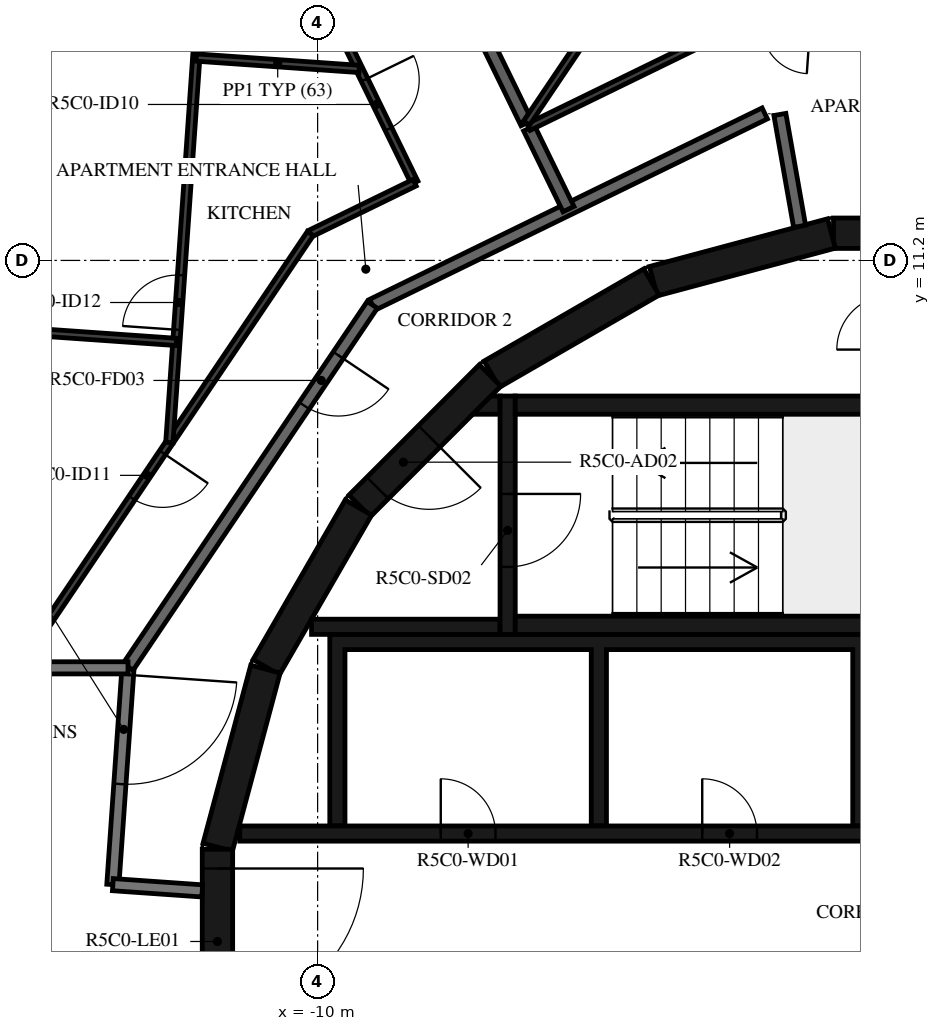
"""IFC4 building model, lengths in metres.
Left out: names, types, materials, properties, quantities, classifications, styles, units other than length and angle.
Written with IfcOpenShell. Run it as: python <this file> out.ifc"""

import sys

from ifc_helpers import new_model, si_unit, direction, frame, frame_2d, origin, place, context, subcontext, project, spatial, polyline, rectangle, outline, extrude, element, fill, save


model = new_model("IFC4")
c1 = context("Model", 3, precision=1e-05, world=origin(), true_north=direction((0.0, 1.0)))
c2 = subcontext(c1, "Body", "Model", "MODEL_VIEW")
j1 = project(units=[si_unit("LENGTHUNIT", "METRE"), si_unit("PLANEANGLEUNIT", "RADIAN")], contexts=[c1])
p1 = place(None, origin())
s1 = spatial("IfcSite", under=j1, at=p1, CompositionType="ELEMENT")
p2 = place(p1, origin())
s2 = spatial("IfcBuilding", under=s1, at=p2, CompositionType="ELEMENT")
p3 = place(p2, frame((0.0, 0.0, 216.4)))
s3 = spatial("IfcBuildingStorey", under=s2, at=p3, CompositionType="ELEMENT", Elevation=216.4)
for number, where, z_axis, x_axis in (
    (1, (1.516, 11.647, 0.0), (0.0, 0.0, 1.0), (-1.0, 0.0, 0.0)),
    (2, (-1.55, 11.643, 0.0), (0.0, 0.0, 1.0), (-0.966, -0.259, 0.0)),
    (3, (-4.51, 10.845, 0.0), (0.0, 0.0, 1.0), (-0.866, -0.5, 0.0)),
):
    element("IfcWall", number, at=place(p3, frame(where, z_axis=z_axis, x_axis=x_axis)), inside=s3, PredefinedType="SHEAR", context=c2, shape_type="SweptSolid", body=[
        extrude(rectangle(XDim=3.033, YDim=0.5, at=frame_2d((1.516, 0.0))), origin(), (0.0, 0.0, 1.0), 3.05),
    ])
p4 = place(p3, frame((-7.164, 9.308, 0.0), z_axis=(0.0, 0.0, 1.0), x_axis=(-0.707106781187, -0.707106781187, 0.0)))
e4 = element("IfcWall", 4, at=p4, inside=s3, PredefinedType="SHEAR", context=c2, shape_type="SweptSolid", body=[
    extrude(rectangle(XDim=3.032, YDim=0.5, at=frame_2d((1.516, 0.0))), origin(), (0.0, 0.0, 1.0), 3.05),
])
p5 = place(p4, frame((1.416, 0.0, 0.0)))
e5 = element("IfcOpeningElement", 5, at=p5, cuts=e4, PredefinedType="OPENING", context=c2, shape_type="SweptSolid", body=[
    extrude(rectangle(XDim=1.2, YDim=2.1, at=frame_2d((0.6, 1.05))), frame((0.0, 0.26, 0.0), z_axis=(0.0, -1.0, 0.0), x_axis=(1.0, 0.0, 0.0)), (0.0, 0.0, 1.0), 0.52),
])
for number, where, z_axis, x_axis in (
    (6, (-9.329, 7.137, 0.0), (0.0, 0.0, 1.0), (-0.5, -0.866, 0.0)),
    (7, (-10.858, 4.479, 0.0), (0.0, 0.0, 1.0), (-0.259, -0.966, 0.0)),
):
    element("IfcWall", number, at=place(p3, frame(where, z_axis=z_axis, x_axis=x_axis)), inside=s3, PredefinedType="SHEAR", context=c2, shape_type="SweptSolid", body=[
        extrude(rectangle(XDim=3.033, YDim=0.5, at=frame_2d((1.516, 0.0))), origin(), (0.0, 0.0, 1.0), 3.05),
    ])
p6 = place(p3, frame((-11.647, 1.516, 0.0), z_axis=(0.0, 0.0, 1.0), x_axis=(0.0, -1.0, 0.0)))
e8 = element("IfcWall", 8, at=p6, inside=s3, PredefinedType="SHEAR", context=c2, shape_type="SweptSolid", body=[
    extrude(rectangle(XDim=3.033, YDim=0.5, at=frame_2d((1.516, 0.0))), origin(), (0.0, 0.0, 1.0), 3.05),
])
p7 = place(p6, frame((0.316, 0.0, 0.0)))
e9 = element("IfcOpeningElement", 9, at=p7, cuts=e8, PredefinedType="OPENING", context=c2, shape_type="SweptSolid", body=[
    extrude(rectangle(XDim=2.4, YDim=2.1, at=frame_2d((1.2, 1.05))), frame((0.0, 0.26, 0.0), z_axis=(0.0, -1.0, 0.0), x_axis=(1.0, 0.0, 0.0)), (0.0, 0.0, 1.0), 0.52),
])
for number, where, z_axis, x_axis in (
    (10, (-6.75, 5.2, 0.0), (0.0, 0.0, 1.0), (1.0, 0.0, 0.0)),
    (11, (-6.75, 8.82, 0.0), (0.0, 0.0, 1.0), (1.0, 0.0, 0.0)),
):
    element("IfcWall", number, at=place(p3, frame(where, z_axis=z_axis, x_axis=x_axis)), inside=s3, PredefinedType="SHEAR", context=c2, shape_type="SweptSolid", body=[
        extrude(rectangle(XDim=6.75, YDim=0.3, at=frame_2d((3.375, 0.0))), origin(), (0.0, 0.0, 1.0), 3.05),
    ])
p8 = place(p3, frame((-6.875, 8.97, 0.0), z_axis=(0.0, 0.0, 1.0), x_axis=(0.0, -1.0, 0.0)))
e12 = element("IfcWall", 12, at=p8, inside=s3, PredefinedType="SHEAR", context=c2, shape_type="SweptSolid", body=[
    extrude(rectangle(XDim=3.92, YDim=0.25, at=frame_2d((1.96, 0.0))), origin(), (0.0, 0.0, 1.0), 3.05),
])
p9 = place(p8, frame((1.61, 0.0, 0.0)))
e13 = element("IfcOpeningElement", 13, at=p9, cuts=e12, PredefinedType="OPENING", context=c2, shape_type="SweptSolid", body=[
    extrude(rectangle(XDim=1.2, YDim=2.1, at=frame_2d((0.6, 1.05))), frame((0.0, 0.135, 0.0), z_axis=(0.0, -1.0, 0.0), x_axis=(1.0, 0.0, 0.0)), (0.0, 0.0, 1.0), 0.27),
])
p10 = place(p3, frame((-7.0, 5.175, 0.0), z_axis=(0.0, 0.0, 1.0), x_axis=(-1.0, 0.0, 0.0)))
e14 = element("IfcWall", 14, at=p10, inside=s3, PredefinedType="SHEAR", context=c2, shape_type="SweptSolid", body=[
    extrude(rectangle(XDim=3.1, YDim=0.25, at=frame_2d((1.55, 0.0))), origin(), (0.0, 0.0, 1.0), 3.05),
])
p11 = place(p3, origin())
e15 = element("IfcWall", 15, at=p11, inside=s3, PredefinedType="SHEAR", context=c2, shape_type="SweptSolid", body=[
    extrude(outline(polyline([(-7.148, 8.97), (-7.0, 8.97), (-7.0, 8.67), (-7.448, 8.67), (-7.148, 8.97)])), origin(), (0.0, 0.0, 1.0), 3.05),
])
p12 = place(p3, origin())
e16 = element("IfcWall", 16, at=p12, inside=s3, PredefinedType="SHEAR", context=c2, shape_type="SweptSolid", body=[
    extrude(outline(polyline([(-9.55, 4.8), (-5.5, 4.8), (-5.5, 1.9), (-5.25, 1.9), (-5.25, 4.8), (-1.2, 4.8), (-1.2, 1.9), (-0.95, 1.9), (-0.95, 4.8), (0.95, 4.8), (0.95, 1.9), (1.2, 1.9), (1.2, 4.8), (3.1, 4.8), (3.1, 1.9), (3.35, 1.9), (3.35, 4.8), (5.25, 4.8), (5.25, 1.9), (5.5, 1.9), (5.5, 4.8), (7.4, 4.8), (7.4, 1.9), (7.65, 1.9), (7.65, 4.8), (9.55, 4.8), (9.55, 1.9), (9.8, 1.9), (9.8, 4.8), (9.8, 5.05), (-9.8, 5.05), (-9.8, 4.8), (-9.8, 1.9), (-9.55, 1.9), (-9.55, 4.8)])), origin(), (0.0, 0.0, 1.0), 3.05),
])
p13 = place(p3, frame((-11.28, 1.775, 0.0), z_axis=(0.0, 0.0, 1.0), x_axis=(1.0, 0.0, 0.0)))
e17 = element("IfcWall", 17, at=p13, inside=s3, PredefinedType="SHEAR", context=c2, shape_type="SweptSolid", body=[
    extrude(rectangle(XDim=14.38, YDim=0.25, at=frame_2d((7.19, 0.0))), origin(), (0.0, 0.0, 1.0), 3.05),
])
p14 = place(p13, frame((10.73, 0.0, 0.0)))
e18 = element("IfcOpeningElement", 18, at=p14, cuts=e17, PredefinedType="OPENING", context=c2, shape_type="SweptSolid", body=[
    extrude(rectangle(XDim=1.1, YDim=2.1, at=frame_2d((0.55, 1.05))), frame((0.0, 0.135, 0.0), z_axis=(0.0, -1.0, 0.0), x_axis=(1.0, 0.0, 0.0)), (0.0, 0.0, 1.0), 0.27),
])
p15 = place(p13, frame((12.88, 0.0, 0.0)))
e19 = element("IfcOpeningElement", 19, at=p15, cuts=e17, PredefinedType="OPENING", context=c2, shape_type="SweptSolid", body=[
    extrude(rectangle(XDim=1.1, YDim=2.1, at=frame_2d((0.55, 1.05))), frame((0.0, 0.135, 0.0), z_axis=(0.0, -1.0, 0.0), x_axis=(1.0, 0.0, 0.0)), (0.0, 0.0, 1.0), 0.27),
])
p16 = place(p13, frame((3.305, 0.0, 0.0)))
e20 = element("IfcOpeningElement", 20, at=p16, cuts=e17, PredefinedType="OPENING", context=c2, shape_type="SweptSolid", body=[
    extrude(rectangle(XDim=0.9, YDim=2.1, at=frame_2d((0.45, 1.05))), frame((0.0, 0.135, 0.0), z_axis=(0.0, -1.0, 0.0), x_axis=(1.0, 0.0, 0.0)), (0.0, 0.0, 1.0), 0.27),
])
p17 = place(p13, frame((7.605, 0.0, 0.0)))
e21 = element("IfcOpeningElement", 21, at=p17, cuts=e17, PredefinedType="OPENING", context=c2, shape_type="SweptSolid", body=[
    extrude(rectangle(XDim=0.9, YDim=2.1, at=frame_2d((0.45, 1.05))), frame((0.0, 0.135, 0.0), z_axis=(0.0, -1.0, 0.0), x_axis=(1.0, 0.0, 0.0)), (0.0, 0.0, 1.0), 0.27),
])
p18 = place(p3, frame((-13.118, 4.5, 0.0), z_axis=(0.0, 0.0, 1.0), x_axis=(-0.069746872611, -0.99756472159, 0.0)))
e22 = element("IfcWall", 22, at=p18, inside=s3, PredefinedType="STANDARD", context=c2, shape_type="SweptSolid", body=[
    extrude(rectangle(XDim=3.574, YDim=0.2, at=frame_2d((1.787, 0.0))), origin(), (0.0, 0.0, 1.0), 3.05),
])
p19 = place(p18, frame((0.115, 0.0, 0.0)))
e23 = element("IfcOpeningElement", 23, at=p19, cuts=e22, PredefinedType="OPENING", context=c2, shape_type="SweptSolid", body=[
    extrude(rectangle(XDim=1.8, YDim=2.1, at=frame_2d((0.9, 1.05))), frame((0.0, 0.11, 0.0), z_axis=(0.0, -1.0, 0.0), x_axis=(1.0, 0.0, 0.0)), (0.0, 0.0, 1.0), 0.22),
])
p20 = place(p3, frame((-13.367, 0.935, 0.0), z_axis=(0.0, 0.0, 1.0), x_axis=(0.997553656289, -0.069904955655, 0.0)))
e24 = element("IfcWall", 24, at=p20, inside=s3, PredefinedType="STANDARD", context=c2, shape_type="SweptSolid", body=[
    extrude(rectangle(XDim=1.474, YDim=0.2, at=frame_2d((0.737, 0.0))), origin(), (0.0, 0.0, 1.0), 3.05),
])
p21 = place(p3, frame((-2.074, 11.761, 0.0), z_axis=(0.0, 0.0, 1.0), x_axis=(-0.173740587112, 0.984791454263, 0.0)))
e25 = element("IfcWall", 25, at=p21, inside=s3, PredefinedType="STANDARD", context=c2, shape_type="SweptSolid", body=[
    extrude(rectangle(XDim=1.867, YDim=0.2, at=frame_2d((0.934, 0.0))), origin(), (0.0, 0.0, 1.0), 3.05),
])
p22 = place(p3, frame((-2.647, 13.618, 0.0), z_axis=(0.0, 0.0, 1.0), x_axis=(-0.898796543751, -0.438366026218, 0.0)))
e26 = element("IfcWall", 26, at=p22, inside=s3, PredefinedType="STANDARD", context=c2, shape_type="SweptSolid", body=[
    extrude(rectangle(XDim=7.181, YDim=0.2, at=frame_2d((3.591, 0.0))), origin(), (0.0, 0.0, 1.0), 3.05),
])
p23 = place(p3, frame((-9.101, 10.47, 0.0), z_axis=(0.0, 0.0, 1.0), x_axis=(-0.559195469534, -0.829035841718, 0.0)))
e27 = element("IfcWall", 27, at=p23, inside=s3, PredefinedType="STANDARD", context=c2, shape_type="SweptSolid", body=[
    extrude(rectangle(XDim=7.181, YDim=0.2, at=frame_2d((3.591, 0.0))), origin(), (0.0, 0.0, 1.0), 3.05),
])
p24 = place(p23, frame((1.0, 0.0, 0.0)))
e28 = element("IfcOpeningElement", 28, at=p24, cuts=e27, PredefinedType="OPENING", context=c2, shape_type="SweptSolid", body=[
    extrude(rectangle(XDim=1.0, YDim=2.1, at=frame_2d((0.5, 1.05))), frame((0.0, 0.11, 0.0), z_axis=(0.0, -1.0, 0.0), x_axis=(1.0, 0.0, 0.0)), (0.0, 0.0, 1.0), 0.22),
])
p25 = place(p3, frame((-13.118, 4.5, 0.0), z_axis=(0.0, 0.0, 1.0), x_axis=(-1.0, 0.0, 0.0)))
e29 = element("IfcWall", 29, at=p25, inside=s3, PredefinedType="STANDARD", context=c2, shape_type="SweptSolid", body=[
    extrude(rectangle(XDim=4.782, YDim=0.2, at=frame_2d((2.391, 0.0))), origin(), (0.0, 0.0, 1.0), 3.05),
])
p26 = place(p3, frame((-6.522, 13.373, 0.0), z_axis=(0.0, 0.0, 1.0), x_axis=(0.438277270821, -0.8988398266, 0.0)))
e30 = element("IfcWall", 30, at=p26, inside=s3, PredefinedType="STANDARD", context=c2, shape_type="SweptSolid", body=[
    extrude(rectangle(XDim=1.479, YDim=0.2, at=frame_2d((0.74, 0.0))), origin(), (0.0, 0.0, 1.0), 3.05),
])
p27 = place(p3, frame((-8.219, 16.851, 0.0), z_axis=(0.0, 0.0, 1.0), x_axis=(0.438291091101, -0.898833087654, 0.0)))
e31 = element("IfcWall", 31, at=p27, inside=s3, PredefinedType="STANDARD", context=c2, shape_type="SweptSolid", body=[
    extrude(rectangle(XDim=3.774, YDim=0.2, at=frame_2d((1.887, 0.0))), origin(), (0.0, 0.0, 1.0), 3.05),
])
p28 = place(p3, frame((4.477, 14.623, 0.0), z_axis=(0.0, 0.0, 1.0), x_axis=(-0.997564862172, 0.069744861884, 0.0)))
e32 = element("IfcWall", 32, at=p28, inside=s3, PredefinedType="PARTITIONING", context=c2, shape_type="SweptSolid", body=[
    extrude(rectangle(XDim=7.438, YDim=0.12, at=frame_2d((3.719, 0.0))), origin(), (0.0, 0.0, 1.0), 3.05),
])
p29 = place(p28, frame((0.2, 0.0, 0.0)))
e33 = element("IfcOpeningElement", 33, at=p29, cuts=e32, PredefinedType="OPENING", context=c2, shape_type="SweptSolid", body=[
    extrude(rectangle(XDim=0.9, YDim=2.1, at=frame_2d((0.45, 1.05))), frame((0.0, 0.07, 0.0), z_axis=(0.0, -1.0, 0.0), x_axis=(1.0, 0.0, 0.0)), (0.0, 0.0, 1.0), 0.14),
])
p30 = place(p28, frame((6.392, 0.0, 0.0)))
e34 = element("IfcOpeningElement", 34, at=p30, cuts=e32, PredefinedType="OPENING", context=c2, shape_type="SweptSolid", body=[
    extrude(rectangle(XDim=0.8, YDim=2.1, at=frame_2d((0.4, 1.05))), frame((0.0, 0.07, 0.0), z_axis=(0.0, -1.0, 0.0), x_axis=(1.0, 0.0, 0.0)), (0.0, 0.0, 1.0), 0.14),
])
p31 = place(p3, frame((-2.943, 15.142, 0.0), z_axis=(0.0, 0.0, 1.0), x_axis=(-0.89881075705, -0.438336883014, 0.0)))
e35 = element("IfcWall", 35, at=p31, inside=s3, PredefinedType="PARTITIONING", context=c2, shape_type="SweptSolid", body=[
    extrude(rectangle(XDim=3.992, YDim=0.12, at=frame_2d((1.996, 0.0))), origin(), (0.0, 0.0, 1.0), 3.05),
])
p32 = place(p3, frame((-3.939, 17.35, 0.0), z_axis=(0.0, 0.0, 1.0), x_axis=(-0.559193216274, -0.829037361566, 0.0)))
e36 = element("IfcWall", 36, at=p32, inside=s3, PredefinedType="PARTITIONING", context=c2, shape_type="SweptSolid", body=[
    extrude(rectangle(XDim=4.694, YDim=0.12, at=frame_2d((2.347, 0.0))), origin(), (0.0, 0.0, 1.0), 3.05),
])
p33 = place(p3, frame((-10.5, 16.775, 0.0), z_axis=(0.0, 0.0, 1.0), x_axis=(0.438345136783, -0.898806731761, 0.0)))
e37 = element("IfcWall", 37, at=p33, inside=s3, PredefinedType="PARTITIONING", context=c2, shape_type="SweptSolid", body=[
    extrude(rectangle(XDim=4.78, YDim=0.12, at=frame_2d((2.39, 0.0))), origin(), (0.0, 0.0, 1.0), 3.05),
])
p34 = place(p33, frame((0.7, 0.0, 0.0)))
e38 = element("IfcOpeningElement", 38, at=p34, cuts=e37, PredefinedType="OPENING", context=c2, shape_type="SweptSolid", body=[
    extrude(rectangle(XDim=0.8, YDim=2.1, at=frame_2d((0.4, 1.05))), frame((0.0, 0.07, 0.0), z_axis=(0.0, -1.0, 0.0), x_axis=(1.0, 0.0, 0.0)), (0.0, 0.0, 1.0), 0.14),
])
p35 = place(p33, frame((2.899, 0.0, 0.0)))
e39 = element("IfcOpeningElement", 39, at=p35, cuts=e37, PredefinedType="OPENING", context=c2, shape_type="SweptSolid", body=[
    extrude(rectangle(XDim=0.9, YDim=2.1, at=frame_2d((0.45, 1.05))), frame((0.0, 0.07, 0.0), z_axis=(0.0, -1.0, 0.0), x_axis=(1.0, 0.0, 0.0)), (0.0, 0.0, 1.0), 0.14),
])
p36 = place(p3, frame((-8.405, 12.479, 0.0), z_axis=(0.0, 0.0, 1.0), x_axis=(-0.898784427692, -0.438390867307, 0.0)))
e40 = element("IfcWall", 40, at=p36, inside=s3, PredefinedType="PARTITIONING", context=c2, shape_type="SweptSolid", body=[
    extrude(rectangle(XDim=1.908, YDim=0.12, at=frame_2d((0.954, 0.0))), origin(), (0.0, 0.0, 1.0), 3.05),
])
p37 = place(p3, frame((-10.12, 11.642, 0.0), z_axis=(0.0, 0.0, 1.0), x_axis=(-0.55920080659, -0.829032241779, 0.0)))
e41 = element("IfcWall", 41, at=p37, inside=s3, PredefinedType="PARTITIONING", context=c2, shape_type="SweptSolid", body=[
    extrude(rectangle(XDim=7.985, YDim=0.12, at=frame_2d((3.992, 0.0))), origin(), (0.0, 0.0, 1.0), 3.05),
])
p38 = place(p37, frame((4.346, 0.0, 0.0)))
e42 = element("IfcOpeningElement", 42, at=p38, cuts=e41, PredefinedType="OPENING", context=c2, shape_type="SweptSolid", body=[
    extrude(rectangle(XDim=0.9, YDim=2.1, at=frame_2d((0.45, 1.05))), frame((0.0, 0.07, 0.0), z_axis=(0.0, -1.0, 0.0), x_axis=(1.0, 0.0, 0.0)), (0.0, 0.0, 1.0), 0.14),
])
p39 = place(p3, frame((-12.439, 8.204, 0.0), z_axis=(0.0, 0.0, 1.0), x_axis=(0.069750037523, 0.997564500303, 0.0)))
e43 = element("IfcWall", 43, at=p39, inside=s3, PredefinedType="PARTITIONING", context=c2, shape_type="SweptSolid", body=[
    extrude(rectangle(XDim=10.014, YDim=0.12, at=frame_2d((5.007, 0.0))), origin(), (0.0, 0.0, 1.0), 3.05),
])
p40 = place(p39, frame((1.859, 0.0, 0.0)))
e44 = element("IfcOpeningElement", 44, at=p40, cuts=e43, PredefinedType="OPENING", context=c2, shape_type="SweptSolid", body=[
    extrude(rectangle(XDim=0.9, YDim=2.1, at=frame_2d((0.45, 1.05))), frame((0.0, 0.07, 0.0), z_axis=(0.0, -1.0, 0.0), x_axis=(1.0, 0.0, 0.0)), (0.0, 0.0, 1.0), 0.14),
])
p41 = place(p3, frame((-11.996, 14.536, 0.0), z_axis=(0.0, 0.0, 1.0), x_axis=(0.997565991425, -0.069728708231, 0.0)))
e45 = element("IfcWall", 45, at=p41, inside=s3, PredefinedType="PARTITIONING", context=c2, shape_type="SweptSolid", body=[
    extrude(rectangle(XDim=2.686, YDim=0.12, at=frame_2d((1.343, 0.0))), origin(), (0.0, 0.0, 1.0), 3.05),
])
p42 = place(p3, frame((-17.51, 10.222, 0.0), z_axis=(0.0, 0.0, 1.0), x_axis=(0.997563184303, -0.069768856397, 0.0)))
e46 = element("IfcWall", 46, at=p42, inside=s3, PredefinedType="PARTITIONING", context=c2, shape_type="SweptSolid", body=[
    extrude(rectangle(XDim=5.2, YDim=0.12, at=frame_2d((2.6, 0.0))), origin(), (0.0, 0.0, 1.0), 3.05),
])
p43 = place(p9, origin())
e47 = element("IfcDoor", 47, at=p43, inside=s3, OperationType="SINGLE_SWING_LEFT", PredefinedType="DOOR", context=c2, shape_type="SweptSolid", body=[
    extrude(rectangle(XDim=1.2, YDim=2.1, at=frame_2d((0.6, 1.05))), frame((0.0, 0.025, 0.0), z_axis=(0.0, -1.0, 0.0), x_axis=(1.0, 0.0, 0.0)), (0.0, 0.0, 1.0), 0.05),
])
fill(e13, e47)
p44 = place(p5, origin())
e48 = element("IfcDoor", 48, at=p44, inside=s3, OperationType="SINGLE_SWING_RIGHT", PredefinedType="DOOR", context=c2, shape_type="SweptSolid", body=[
    extrude(rectangle(XDim=1.2, YDim=2.1, at=frame_2d((0.6, 1.05))), frame((0.0, 0.025, 0.0), z_axis=(0.0, -1.0, 0.0), x_axis=(1.0, 0.0, 0.0)), (0.0, 0.0, 1.0), 0.05),
])
fill(e5, e48)
p45 = place(p7, origin())
e49 = element("IfcDoor", 49, at=p45, inside=s3, OperationType="DOUBLE_DOOR_SINGLE_SWING", PredefinedType="DOOR", context=c2, shape_type="SweptSolid", body=[
    extrude(rectangle(XDim=2.4, YDim=2.1, at=frame_2d((1.2, 1.05))), frame((0.0, 0.025, 0.0), z_axis=(0.0, -1.0, 0.0), x_axis=(1.0, 0.0, 0.0)), (0.0, 0.0, 1.0), 0.05),
])
fill(e9, e49)
p46 = place(p16, origin())
e50 = element("IfcDoor", 50, at=p46, inside=s3, OperationType="SINGLE_SWING_LEFT", PredefinedType="DOOR", context=c2, shape_type="SweptSolid", body=[
    extrude(rectangle(XDim=0.9, YDim=2.1, at=frame_2d((0.45, 1.05))), frame((0.0, 0.025, 0.0), z_axis=(0.0, -1.0, 0.0), x_axis=(1.0, 0.0, 0.0)), (0.0, 0.0, 1.0), 0.05),
])
fill(e20, e50)
p47 = place(p17, origin())
e51 = element("IfcDoor", 51, at=p47, inside=s3, OperationType="SINGLE_SWING_RIGHT", PredefinedType="DOOR", context=c2, shape_type="SweptSolid", body=[
    extrude(rectangle(XDim=0.9, YDim=2.1, at=frame_2d((0.45, 1.05))), frame((0.0, 0.025, 0.0), z_axis=(0.0, -1.0, 0.0), x_axis=(1.0, 0.0, 0.0)), (0.0, 0.0, 1.0), 0.05),
])
fill(e21, e51)
p48 = place(p24, origin())
e52 = element("IfcDoor", 52, at=p48, inside=s3, OperationType="SINGLE_SWING_LEFT", PredefinedType="DOOR", context=c2, shape_type="SweptSolid", body=[
    extrude(rectangle(XDim=1.0, YDim=2.1, at=frame_2d((0.5, 1.05))), frame((0.0, 0.025, 0.0), z_axis=(0.0, -1.0, 0.0), x_axis=(1.0, 0.0, 0.0)), (0.0, 0.0, 1.0), 0.05),
])
fill(e28, e52)
p49 = place(p35, origin())
e53 = element("IfcDoor", 53, at=p49, inside=s3, OperationType="SINGLE_SWING_LEFT", PredefinedType="DOOR", context=c2, shape_type="SweptSolid", body=[
    extrude(rectangle(XDim=0.9, YDim=2.1, at=frame_2d((0.45, 1.05))), frame((0.0, 0.025, 0.0), z_axis=(0.0, -1.0, 0.0), x_axis=(1.0, 0.0, 0.0)), (0.0, 0.0, 1.0), 0.05),
])
fill(e39, e53)
p50 = place(p38, origin())
e54 = element("IfcDoor", 54, at=p50, inside=s3, OperationType="SINGLE_SWING_LEFT", PredefinedType="DOOR", context=c2, shape_type="SweptSolid", body=[
    extrude(rectangle(XDim=0.9, YDim=2.1, at=frame_2d((0.45, 1.05))), frame((0.0, 0.025, 0.0), z_axis=(0.0, -1.0, 0.0), x_axis=(1.0, 0.0, 0.0)), (0.0, 0.0, 1.0), 0.05),
])
fill(e42, e54)
p51 = place(p40, origin())
e55 = element("IfcDoor", 55, at=p51, inside=s3, OperationType="SINGLE_SWING_LEFT", PredefinedType="DOOR", context=c2, shape_type="SweptSolid", body=[
    extrude(rectangle(XDim=0.9, YDim=2.1, at=frame_2d((0.45, 1.05))), frame((0.0, 0.025, 0.0), z_axis=(0.0, -1.0, 0.0), x_axis=(1.0, 0.0, 0.0)), (0.0, 0.0, 1.0), 0.05),
])
fill(e44, e55)
p52 = place(p19, origin())
e56 = element("IfcDoor", 56, at=p52, inside=s3, OperationType="DOUBLE_DOOR_SINGLE_SWING", PredefinedType="DOOR", context=c2, shape_type="SweptSolid", body=[
    extrude(rectangle(XDim=1.8, YDim=2.1, at=frame_2d((0.9, 1.05))), frame((0.0, 0.025, 0.0), z_axis=(0.0, -1.0, 0.0), x_axis=(1.0, 0.0, 0.0)), (0.0, 0.0, 1.0), 0.05),
])
fill(e23, e56)
save(model, sys.argv[1])
